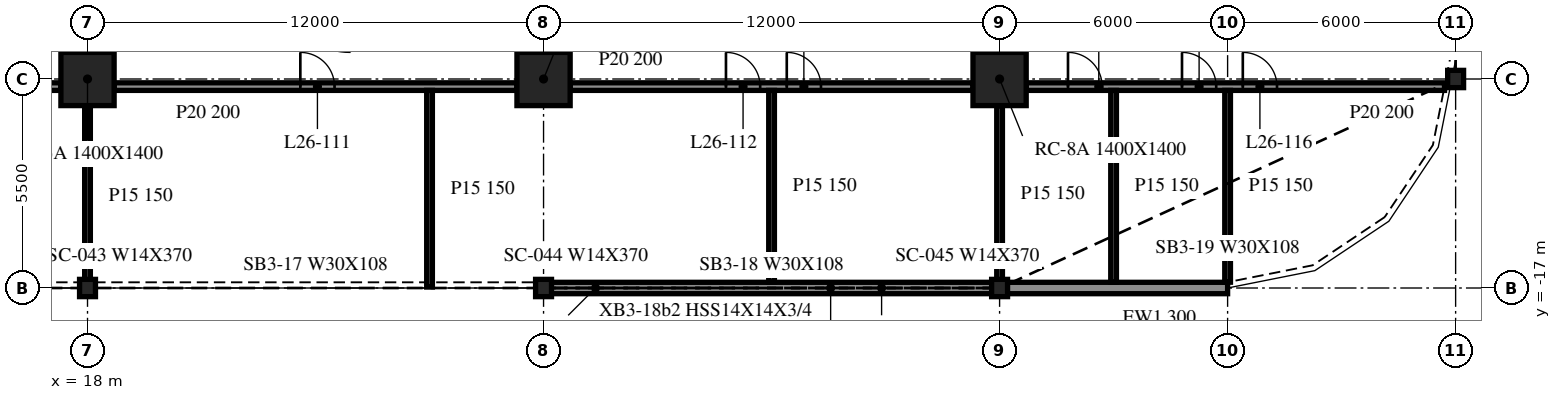
"""IFC4 building model, lengths in metres.
Left out: names, types, materials, properties, quantities, classifications, styles, units other than length and angle.
Written with IfcOpenShell. Run it as: python <this file> out.ifc"""

import sys

from ifc_helpers import new_model, si_unit, direction, frame, frame_2d, origin, origin_2d, place, context, subcontext, project, spatial, rectangle, i_section, extrude, element, fill, save


model = new_model("IFC4")
c1 = context("Model", 3, precision=1e-05, world=origin(), true_north=direction((0.0, 1.0)))
c2 = subcontext(c1, "Body", "Model", "MODEL_VIEW")
j1 = project(units=[si_unit("LENGTHUNIT", "METRE"), si_unit("PLANEANGLEUNIT", "RADIAN")], contexts=[c1])
p1 = place(None, origin())
s1 = spatial("IfcSite", under=j1, at=p1, CompositionType="ELEMENT")
p2 = place(p1, origin())
s2 = spatial("IfcBuilding", under=s1, at=p2, CompositionType="ELEMENT")
p3 = place(p2, frame((0.0, 0.0, 113.5)))
s3 = spatial("IfcBuildingStorey", under=s2, at=p3, CompositionType="ELEMENT", Elevation=113.5)
for number, where, z_axis, x_axis in (
    (1, (18.0, -11.5, -0.34), (0.0, 0.0, 1.0), (1.0, 0.0, 0.0)),
    (2, (30.0, -11.5, -0.34), (0.0, 0.0, 1.0), (1.0, 0.0, 0.0)),
    (3, (42.0, -11.5, -0.34), (0.0, 0.0, 1.0), (1.0, 0.0, 0.0)),
):
    element("IfcColumn", number, at=place(p3, frame(where, z_axis=z_axis, x_axis=x_axis)), inside=s3, PredefinedType="COLUMN", context=c2, shape_type="SweptSolid", body=[
        extrude(rectangle(XDim=1.4, YDim=1.4, at=origin_2d()), origin(), (0.0, 0.0, 1.0), 3.89),
    ])
for number, where, z_axis, x_axis in (
    (4, (18.0, -17.0, -0.34), (0.0, 0.0, 1.0), (1.0, 0.0, 0.0)),
    (5, (30.0, -17.0, -0.34), (0.0, 0.0, 1.0), (1.0, 0.0, 0.0)),
    (6, (42.0, -17.0, -0.34), (0.0, 0.0, 1.0), (1.0, 0.0, 0.0)),
    (7, (54.0, -11.5, -0.34), (0.0, 0.0, 1.0), (1.0, 0.0, 0.0)),
):
    element("IfcColumn", number, at=place(p3, frame(where, z_axis=z_axis, x_axis=x_axis)), inside=s3, PredefinedType="COLUMN", context=c2, shape_type="SweptSolid", body=[
        extrude(i_section(OverallWidth=0.419, OverallDepth=0.455, WebThickness=0.042, FlangeThickness=0.068, at=origin_2d()), origin(), (0.0, 0.0, 1.0), 3.89),
    ])
p4 = place(p3, frame((30.021, -17.0, 0.0), z_axis=(0.0, 0.0, 1.0), x_axis=(1.0, 0.0, 0.0)))
e8 = element("IfcWall", 8, at=p4, inside=s3, PredefinedType="NOTDEFINED", context=c2, shape_type="SweptSolid", body=[
    extrude(rectangle(XDim=11.958, YDim=0.3, at=frame_2d((5.979, 0.0))), origin(), (0.0, 0.0, 1.0), 3.55),
])
p5 = place(p3, frame((42.021, -17.0, 0.0), z_axis=(0.0, 0.0, 1.0), x_axis=(1.0, 0.0, 0.0)))
e9 = element("IfcWall", 9, at=p5, inside=s3, PredefinedType="NOTDEFINED", context=c2, shape_type="SweptSolid", body=[
    extrude(rectangle(XDim=5.979, YDim=0.3, at=frame_2d((2.99, 0.0))), origin(), (0.0, 0.0, 1.0), 3.55),
])
p6 = place(p3, frame((6.7, -11.7, 0.0), z_axis=(0.0, 0.0, 1.0), x_axis=(1.0, 0.0, 0.0)))
e10 = element("IfcWall", 10, at=p6, inside=s3, PredefinedType="PARTITIONING", context=c2, shape_type="SweptSolid", body=[
    extrude(rectangle(XDim=10.6, YDim=0.2, at=frame_2d((5.3, 0.0))), origin(), (0.0, 0.0, 1.0), 3.55),
])
p7 = place(p6, frame((4.1, 0.0, 0.0)))
e11 = element("IfcOpeningElement", 11, at=p7, cuts=e10, PredefinedType="OPENING", context=c2, shape_type="SweptSolid", body=[
    extrude(rectangle(XDim=0.9, YDim=2.1, at=frame_2d((0.45, 1.05))), frame((0.0, 0.11, 0.0), z_axis=(0.0, -1.0, 0.0), x_axis=(1.0, 0.0, 0.0)), (0.0, 0.0, 1.0), 0.22),
])
p8 = place(p6, frame((5.7, 0.0, 0.0)))
e12 = element("IfcOpeningElement", 12, at=p8, cuts=e10, PredefinedType="OPENING", context=c2, shape_type="SweptSolid", body=[
    extrude(rectangle(XDim=0.9, YDim=2.1, at=frame_2d((0.45, 1.05))), frame((0.0, 0.11, 0.0), z_axis=(0.0, -1.0, 0.0), x_axis=(1.0, 0.0, 0.0)), (0.0, 0.0, 1.0), 0.22),
])
p9 = place(p6, frame((8.7, 0.0, 0.0)))
e13 = element("IfcOpeningElement", 13, at=p9, cuts=e10, PredefinedType="OPENING", context=c2, shape_type="SweptSolid", body=[
    extrude(rectangle(XDim=0.9, YDim=2.1, at=frame_2d((0.45, 1.05))), frame((0.0, 0.11, 0.0), z_axis=(0.0, -1.0, 0.0), x_axis=(1.0, 0.0, 0.0)), (0.0, 0.0, 1.0), 0.22),
])
p10 = place(p3, frame((18.7, -11.7, 0.0), z_axis=(0.0, 0.0, 1.0), x_axis=(1.0, 0.0, 0.0)))
e14 = element("IfcWall", 14, at=p10, inside=s3, PredefinedType="PARTITIONING", context=c2, shape_type="SweptSolid", body=[
    extrude(rectangle(XDim=10.6, YDim=0.2, at=frame_2d((5.3, 0.0))), origin(), (0.0, 0.0, 1.0), 3.55),
])
p11 = place(p10, frame((4.9, 0.0, 0.0)))
e15 = element("IfcOpeningElement", 15, at=p11, cuts=e14, PredefinedType="OPENING", context=c2, shape_type="SweptSolid", body=[
    extrude(rectangle(XDim=0.9, YDim=2.1, at=frame_2d((0.45, 1.05))), frame((0.0, 0.11, 0.0), z_axis=(0.0, -1.0, 0.0), x_axis=(1.0, 0.0, 0.0)), (0.0, 0.0, 1.0), 0.22),
])
p12 = place(p3, frame((30.7, -11.7, 0.0), z_axis=(0.0, 0.0, 1.0), x_axis=(1.0, 0.0, 0.0)))
e16 = element("IfcWall", 16, at=p12, inside=s3, PredefinedType="PARTITIONING", context=c2, shape_type="SweptSolid", body=[
    extrude(rectangle(XDim=10.6, YDim=0.2, at=frame_2d((5.3, 0.0))), origin(), (0.0, 0.0, 1.0), 2.551),
])
p13 = place(p12, frame((4.1, 0.0, 0.0)))
e17 = element("IfcOpeningElement", 17, at=p13, cuts=e16, PredefinedType="OPENING", context=c2, shape_type="SweptSolid", body=[
    extrude(rectangle(XDim=0.9, YDim=2.1, at=frame_2d((0.45, 1.05))), frame((0.0, 0.11, 0.0), z_axis=(0.0, -1.0, 0.0), x_axis=(1.0, 0.0, 0.0)), (0.0, 0.0, 1.0), 0.22),
])
p14 = place(p12, frame((5.7, 0.0, 0.0)))
e18 = element("IfcOpeningElement", 18, at=p14, cuts=e16, PredefinedType="OPENING", context=c2, shape_type="SweptSolid", body=[
    extrude(rectangle(XDim=0.9, YDim=2.1, at=frame_2d((0.45, 1.05))), frame((0.0, 0.11, 0.0), z_axis=(0.0, -1.0, 0.0), x_axis=(1.0, 0.0, 0.0)), (0.0, 0.0, 1.0), 0.22),
])
p15 = place(p3, frame((42.7, -11.7, 0.0), z_axis=(0.0, 0.0, 1.0), x_axis=(1.0, 0.0, 0.0)))
e19 = element("IfcWall", 19, at=p15, inside=s3, PredefinedType="PARTITIONING", context=c2, shape_type="SweptSolid", body=[
    extrude(rectangle(XDim=11.008, YDim=0.2, at=frame_2d((5.504, 0.0))), origin(), (0.0, 0.0, 1.0), 2.551),
])
p16 = place(p15, frame((1.1, 0.0, 0.0)))
e20 = element("IfcOpeningElement", 20, at=p16, cuts=e19, PredefinedType="OPENING", context=c2, shape_type="SweptSolid", body=[
    extrude(rectangle(XDim=0.9, YDim=2.1, at=frame_2d((0.45, 1.05))), frame((0.0, 0.11, 0.0), z_axis=(0.0, -1.0, 0.0), x_axis=(1.0, 0.0, 0.0)), (0.0, 0.0, 1.0), 0.22),
])
p17 = place(p15, frame((4.1, 0.0, 0.0)))
e21 = element("IfcOpeningElement", 21, at=p17, cuts=e19, PredefinedType="OPENING", context=c2, shape_type="SweptSolid", body=[
    extrude(rectangle(XDim=0.9, YDim=2.1, at=frame_2d((0.45, 1.05))), frame((0.0, 0.11, 0.0), z_axis=(0.0, -1.0, 0.0), x_axis=(1.0, 0.0, 0.0)), (0.0, 0.0, 1.0), 0.22),
])
p18 = place(p15, frame((5.7, 0.0, 0.0)))
e22 = element("IfcOpeningElement", 22, at=p18, cuts=e19, PredefinedType="OPENING", context=c2, shape_type="SweptSolid", body=[
    extrude(rectangle(XDim=0.9, YDim=2.1, at=frame_2d((0.45, 1.05))), frame((0.0, 0.11, 0.0), z_axis=(0.0, -1.0, 0.0), x_axis=(1.0, 0.0, 0.0)), (0.0, 0.0, 1.0), 0.22),
])
p19 = place(p3, frame((18.0, -16.975, 0.0), z_axis=(0.0, 0.0, 1.0), x_axis=(0.0, 1.0, 0.0)))
e23 = element("IfcWall", 23, at=p19, inside=s3, PredefinedType="PARTITIONING", context=c2, shape_type="SweptSolid", body=[
    extrude(rectangle(XDim=4.775, YDim=0.15, at=frame_2d((2.388, 0.0))), origin(), (0.0, 0.0, 1.0), 3.55),
])
p20 = place(p3, frame((27.0, -16.975, 0.0), z_axis=(0.0, 0.0, 1.0), x_axis=(0.0, 1.0, 0.0)))
e24 = element("IfcWall", 24, at=p20, inside=s3, PredefinedType="PARTITIONING", context=c2, shape_type="SweptSolid", body=[
    extrude(rectangle(XDim=5.175, YDim=0.15, at=frame_2d((2.587, 0.0))), origin(), (0.0, 0.0, 1.0), 3.55),
])
p21 = place(p3, frame((36.0, -16.85, 0.0), z_axis=(0.0, 0.0, 1.0), x_axis=(0.0, 1.0, 0.0)))
e25 = element("IfcWall", 25, at=p21, inside=s3, PredefinedType="PARTITIONING", context=c2, shape_type="SweptSolid", body=[
    extrude(rectangle(XDim=5.05, YDim=0.15, at=frame_2d((2.525, 0.0))), origin(), (0.0, 0.0, 1.0), 3.55),
])
p22 = place(p3, frame((42.0, -16.85, 0.0), z_axis=(0.0, 0.0, 1.0), x_axis=(0.0, 1.0, 0.0)))
e26 = element("IfcWall", 26, at=p22, inside=s3, PredefinedType="PARTITIONING", context=c2, shape_type="SweptSolid", body=[
    extrude(rectangle(XDim=4.65, YDim=0.15, at=frame_2d((2.325, 0.0))), origin(), (0.0, 0.0, 1.0), 3.55),
])
p23 = place(p3, frame((45.0, -16.85, 0.0), z_axis=(0.0, 0.0, 1.0), x_axis=(0.0, 1.0, 0.0)))
e27 = element("IfcWall", 27, at=p23, inside=s3, PredefinedType="PARTITIONING", context=c2, shape_type="SweptSolid", body=[
    extrude(rectangle(XDim=5.05, YDim=0.15, at=frame_2d((2.525, 0.0))), origin(), (0.0, 0.0, 1.0), 3.55),
])
p24 = place(p3, frame((48.0, -16.847, 0.0), z_axis=(0.0, 0.0, 1.0), x_axis=(0.0, 1.0, 0.0)))
e28 = element("IfcWall", 28, at=p24, inside=s3, PredefinedType="PARTITIONING", context=c2, shape_type="SweptSolid", body=[
    extrude(rectangle(XDim=5.047, YDim=0.15, at=frame_2d((2.523, 0.0))), origin(), (0.0, 0.0, 1.0), 3.55),
])
p25 = place(p11, origin())
e29 = element("IfcDoor", 29, at=p25, inside=s3, OperationType="SINGLE_SWING_LEFT", PredefinedType="DOOR", context=c2, shape_type="SweptSolid", body=[
    extrude(rectangle(XDim=0.9, YDim=2.1, at=frame_2d((0.45, 1.05))), frame((0.0, 0.025, 0.0), z_axis=(0.0, -1.0, 0.0), x_axis=(1.0, 0.0, 0.0)), (0.0, 0.0, 1.0), 0.05),
])
fill(e15, e29)
p26 = place(p13, origin())
e30 = element("IfcDoor", 30, at=p26, inside=s3, OperationType="SINGLE_SWING_RIGHT", PredefinedType="DOOR", context=c2, shape_type="SweptSolid", body=[
    extrude(rectangle(XDim=0.9, YDim=2.1, at=frame_2d((0.45, 1.05))), frame((0.0, 0.025, 0.0), z_axis=(0.0, -1.0, 0.0), x_axis=(1.0, 0.0, 0.0)), (0.0, 0.0, 1.0), 0.05),
])
fill(e17, e30)
p27 = place(p14, origin())
e31 = element("IfcDoor", 31, at=p27, inside=s3, OperationType="SINGLE_SWING_LEFT", PredefinedType="DOOR", context=c2, shape_type="SweptSolid", body=[
    extrude(rectangle(XDim=0.9, YDim=2.1, at=frame_2d((0.45, 1.05))), frame((0.0, 0.025, 0.0), z_axis=(0.0, -1.0, 0.0), x_axis=(1.0, 0.0, 0.0)), (0.0, 0.0, 1.0), 0.05),
])
fill(e18, e31)
p28 = place(p16, origin())
e32 = element("IfcDoor", 32, at=p28, inside=s3, OperationType="SINGLE_SWING_RIGHT", PredefinedType="DOOR", context=c2, shape_type="SweptSolid", body=[
    extrude(rectangle(XDim=0.9, YDim=2.1, at=frame_2d((0.45, 1.05))), frame((0.0, 0.025, 0.0), z_axis=(0.0, -1.0, 0.0), x_axis=(1.0, 0.0, 0.0)), (0.0, 0.0, 1.0), 0.05),
])
fill(e20, e32)
p29 = place(p17, origin())
e33 = element("IfcDoor", 33, at=p29, inside=s3, OperationType="SINGLE_SWING_RIGHT", PredefinedType="DOOR", context=c2, shape_type="SweptSolid", body=[
    extrude(rectangle(XDim=0.9, YDim=2.1, at=frame_2d((0.45, 1.05))), frame((0.0, 0.025, 0.0), z_axis=(0.0, -1.0, 0.0), x_axis=(1.0, 0.0, 0.0)), (0.0, 0.0, 1.0), 0.05),
])
fill(e21, e33)
p30 = place(p18, origin())
e34 = element("IfcDoor", 34, at=p30, inside=s3, OperationType="SINGLE_SWING_LEFT", PredefinedType="DOOR", context=c2, shape_type="SweptSolid", body=[
    extrude(rectangle(XDim=0.9, YDim=2.1, at=frame_2d((0.45, 1.05))), frame((0.0, 0.025, 0.0), z_axis=(0.0, -1.0, 0.0), x_axis=(1.0, 0.0, 0.0)), (0.0, 0.0, 1.0), 0.05),
])
fill(e22, e34)
save(model, sys.argv[1])
